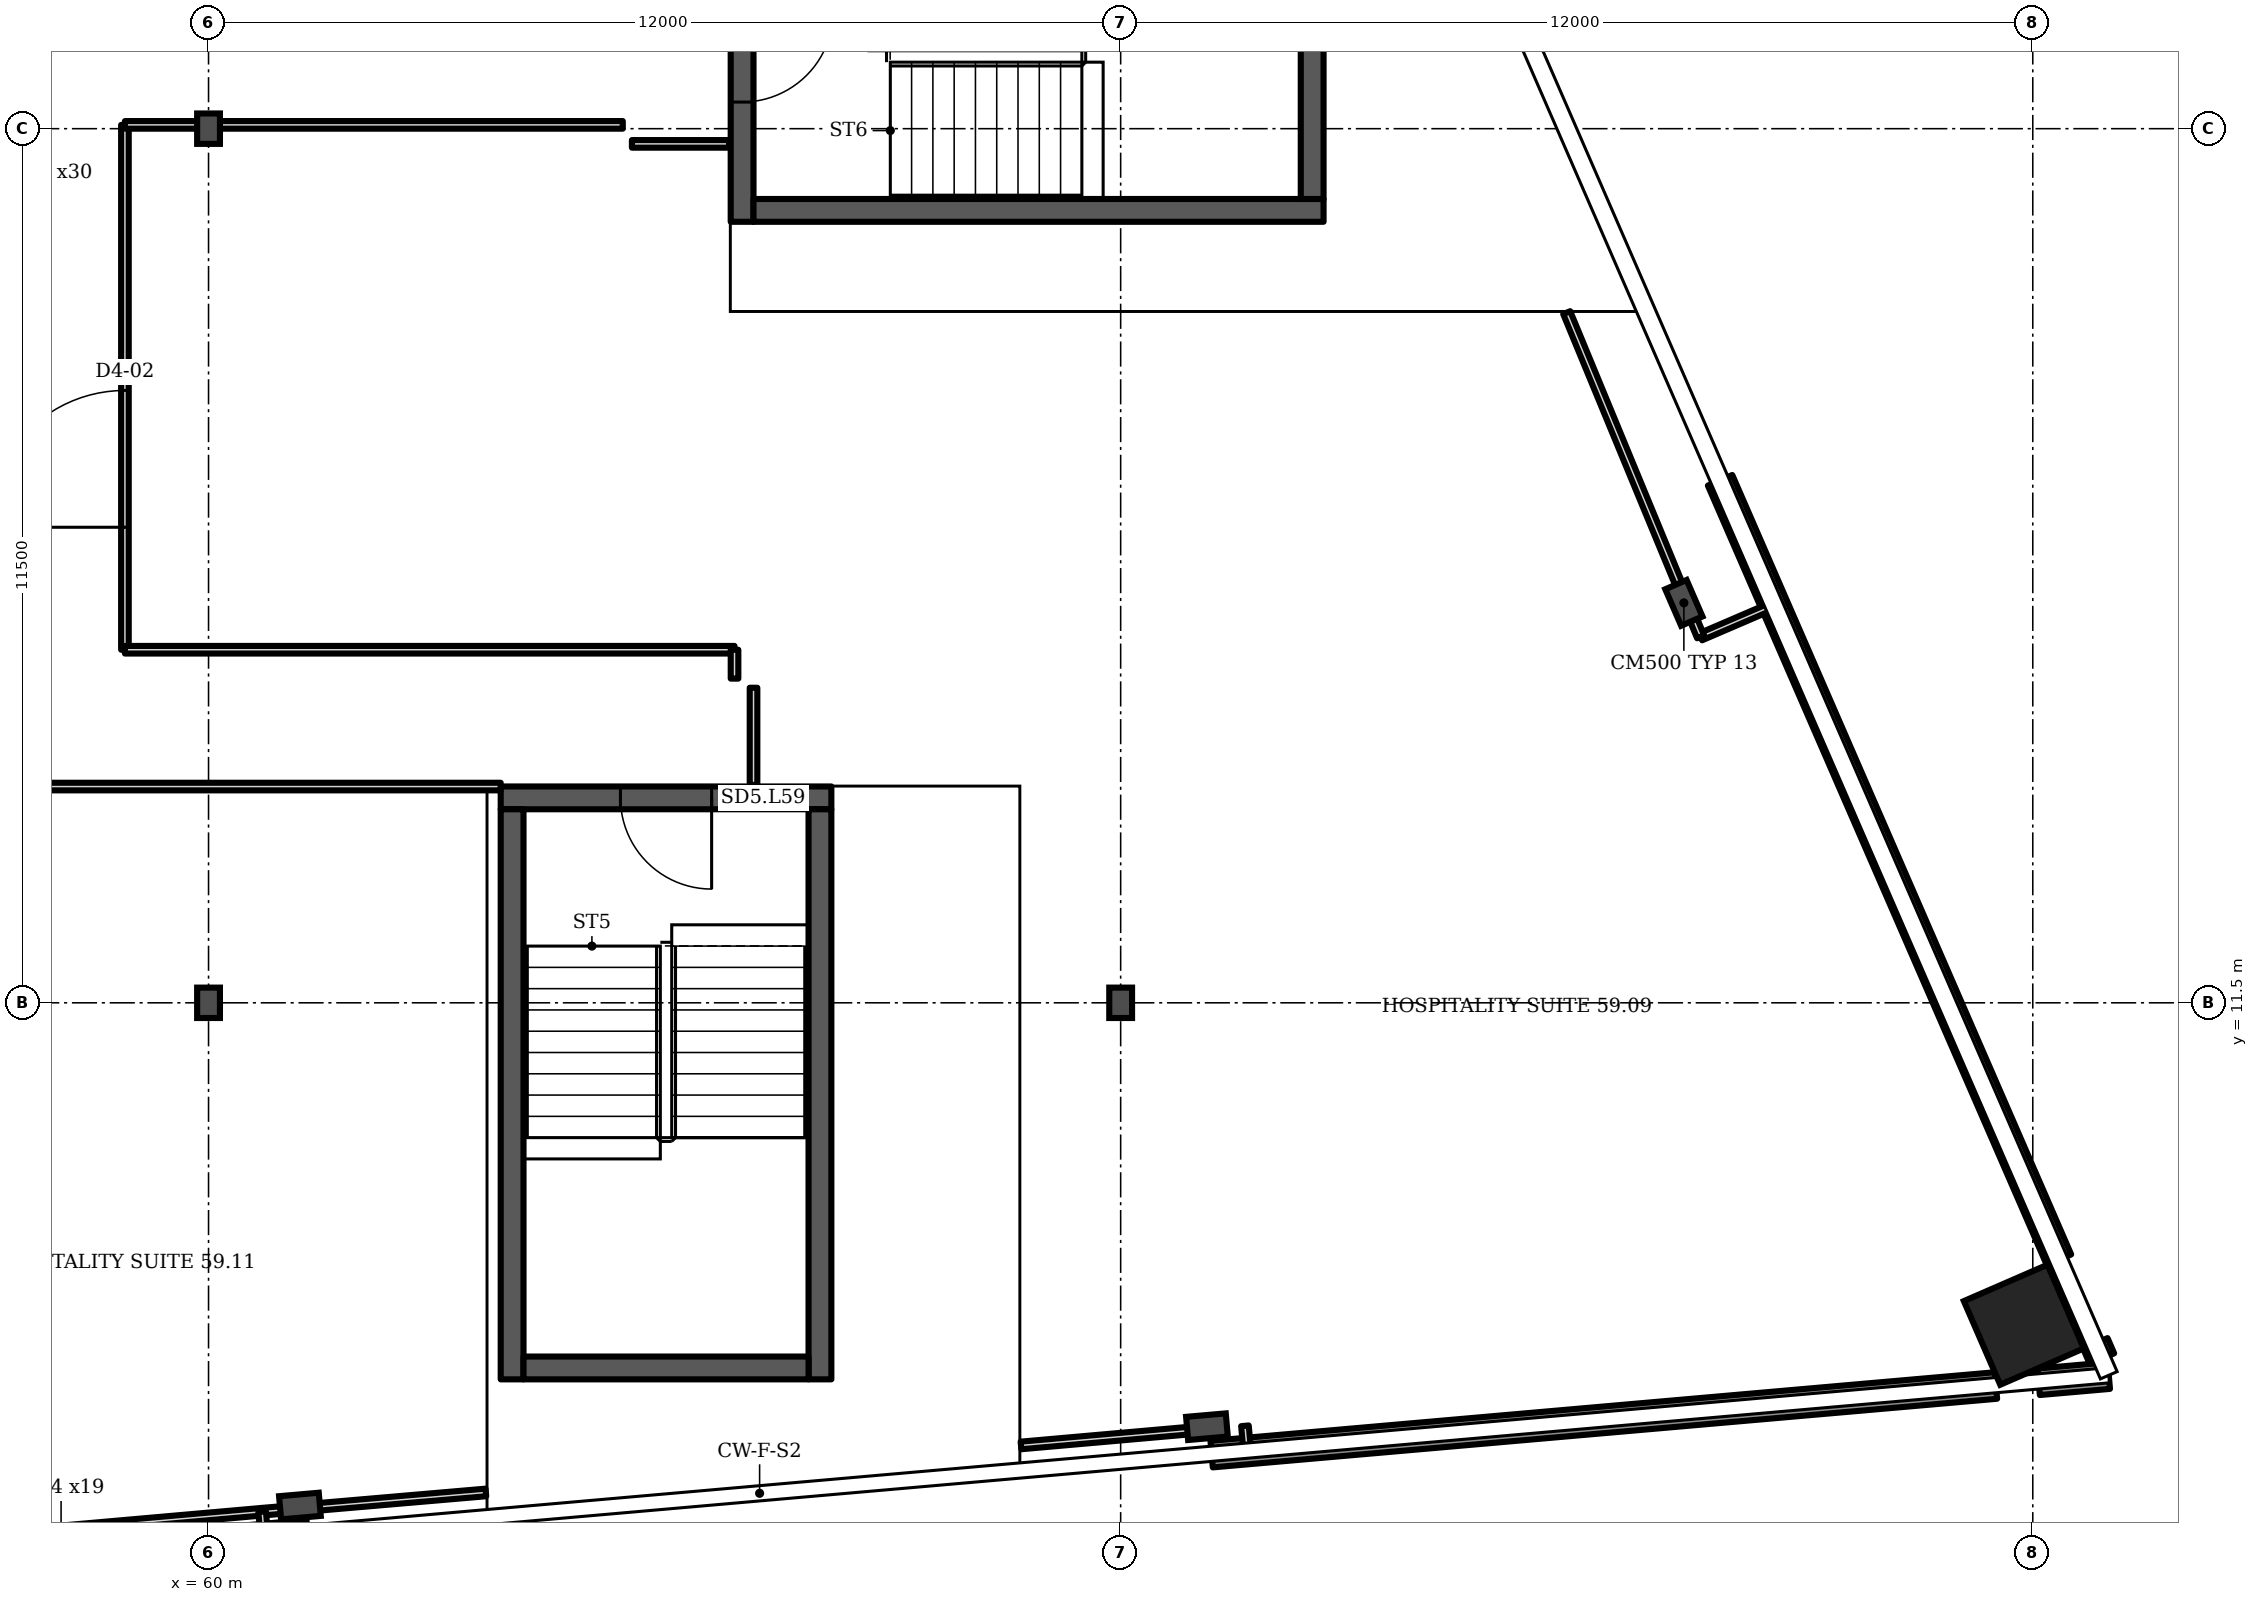
"""IFC4 building model, lengths in metres.
Left out: names, types, materials, properties, quantities, classifications, styles, units other than length and angle.
Written with IfcOpenShell. Run it as: python <this file> out.ifc"""

import sys

from ifc_helpers import new_model, si_unit, direction, frame, frame_2d, origin, origin_2d, place, context, subcontext, project, spatial, rectangle, i_section, extrude, element, fill, save


model = new_model("IFC4")
c1 = context("Model", 3, precision=1e-05, world=origin(), true_north=direction((0.0, 1.0)))
c2 = subcontext(c1, "Body", "Model", "MODEL_VIEW")
j1 = project(units=[si_unit("LENGTHUNIT", "METRE"), si_unit("PLANEANGLEUNIT", "RADIAN")], contexts=[c1])
p1 = place(None, origin())
s1 = spatial("IfcSite", under=j1, at=p1, CompositionType="ELEMENT")
p2 = place(p1, origin())
s2 = spatial("IfcBuilding", under=s1, at=p2, CompositionType="ELEMENT")
p3 = place(p2, frame((0.0, 0.0, 235.9)))
s3 = spatial("IfcBuildingStorey", under=s2, at=p3, CompositionType="ELEMENT", Elevation=235.9)
p4 = place(p3, frame((83.883, 7.265, 0.0), z_axis=(0.0, 0.0, 1.0), x_axis=(-0.398727, 0.917072, 0.0)))
e1 = element("IfcColumn", 1, at=p4, inside=s3, PredefinedType="COLUMN", context=c2, shape_type="SweptSolid", body=[
    extrude(rectangle(XDim=1.2, YDim=1.2, at=origin_2d()), origin(), (0.0, 0.0, 1.0), 3.6),
])
for number, where, z_axis, x_axis in (
    (2, (61.202, 4.879, 0.0), (0.0, 0.0, 1.0), (0.087, -0.996, 0.0)),
    (3, (73.135, 5.923, 0.0), (0.0, 0.0, 1.0), (0.087, -0.996, 0.0)),
    (4, (79.41, 16.762, 0.0), (0.0, 0.0, 1.0), (0.917, 0.399, 0.0)),
):
    element("IfcColumn", number, at=place(p3, frame(where, z_axis=z_axis, x_axis=x_axis)), inside=s3, PredefinedType="COLUMN", context=c2, shape_type="SweptSolid", body=[
        extrude(i_section(OverallWidth=0.306, OverallDepth=0.524, WebThickness=0.021, FlangeThickness=0.04, FilletRadius=0.027, at=origin_2d()), origin(), (0.0, 0.0, 1.0), 3.6),
    ])
for number, where, z_axis, x_axis in (
    (5, (60.0, 11.5, 0.0), (0.0, 0.0, 1.0), (1.0, 0.0, 0.0)),
    (6, (72.0, 11.5, 0.0), (0.0, 0.0, 1.0), (1.0, 0.0, 0.0)),
    (7, (60.0, 23.0, 0.0), (0.0, 0.0, 1.0), (1.0, 0.0, 0.0)),
):
    element("IfcColumn", number, at=place(p3, frame(where, z_axis=z_axis, x_axis=x_axis)), inside=s3, PredefinedType="COLUMN", context=c2, shape_type="SweptSolid", body=[
        extrude(i_section(OverallWidth=0.3, OverallDepth=0.4, WebThickness=0.013, FlangeThickness=0.024, FilletRadius=0.027, at=origin_2d()), origin(), (0.0, 0.0, 1.0), 3.6),
    ])
p5 = place(p3, frame((49.545, 3.493, 0.0), z_axis=(0.0, 0.0, 1.0), x_axis=(0.996196, 0.087141, 0.0)))
e8 = element("IfcWall", 8, at=p5, inside=s3, PredefinedType="SOLIDWALL", context=c2, shape_type="SweptSolid", body=[
    extrude(rectangle(XDim=11.803, YDim=0.35, at=frame_2d((5.902, 0.0))), origin(), (0.0, 0.0, 1.0), 1.0),
])
p6 = place(p3, frame((73.197, 5.562, 0.0), z_axis=(0.0, 0.0, 1.0), x_axis=(0.996198, 0.087163, 0.0)))
e9 = element("IfcWall", 9, at=p6, inside=s3, PredefinedType="SOLIDWALL", context=c2, shape_type="SweptSolid", body=[
    extrude(rectangle(XDim=10.358, YDim=0.35, at=frame_2d((5.179, 0.0))), origin(), (0.0, 0.0, 1.0), 1.0),
])
p7 = place(p3, frame((84.078, 6.514, 0.0), z_axis=(0.0, 0.0, 1.0), x_axis=(0.996213, 0.086971, 0.0)))
e10 = element("IfcWall", 10, at=p7, inside=s3, PredefinedType="SOLIDWALL", context=c2, shape_type="SweptSolid", body=[
    extrude(rectangle(XDim=0.926, YDim=0.35, at=frame_2d((0.463, 0.0))), origin(), (0.0, 0.0, 1.0), 1.0),
])
p8 = place(p3, frame((84.91, 6.819, 0.0), z_axis=(0.0, 0.0, 1.0), x_axis=(-0.398359, 0.91723, 0.0)))
e11 = element("IfcWall", 11, at=p8, inside=s3, PredefinedType="SOLIDWALL", context=c2, shape_type="SweptSolid", body=[
    extrude(rectangle(XDim=0.219, YDim=0.35, at=frame_2d((0.109, 0.0))), origin(), (0.0, 0.0, 1.0), 1.0),
])
p9 = place(p3, frame((84.345, 8.12, 0.0), z_axis=(0.0, 0.0, 1.0), x_axis=(-0.398721, 0.917067, 0.0)))
e12 = element("IfcWall", 12, at=p9, inside=s3, PredefinedType="SOLIDWALL", context=c2, shape_type="SweptSolid", body=[
    extrude(rectangle(XDim=11.182, YDim=0.35, at=frame_2d((5.591, 0.0))), origin(), (0.0, 0.0, 1.0), 1.0),
])
p10 = place(p3, frame((63.844, 14.196, 0.0), z_axis=(0.0, 0.0, 1.0), x_axis=(1.0, 0.0, 0.0)))
e13 = element("IfcWall", 13, at=p10, inside=s3, PredefinedType="SHEAR", context=c2, shape_type="SweptSolid", body=[
    extrude(rectangle(XDim=4.35, YDim=0.3, at=frame_2d((2.175, 0.0))), origin(), (0.0, 0.0, 1.0), 3.2),
])
p11 = place(p10, frame((1.575, 0.0, 0.0)))
e14 = element("IfcOpeningElement", 14, at=p11, cuts=e13, PredefinedType="OPENING", context=c2, shape_type="SweptSolid", body=[
    extrude(rectangle(XDim=1.2, YDim=2.1, at=frame_2d((0.6, 1.05))), frame((0.0, 0.16, 0.0), z_axis=(0.0, -1.0, 0.0), x_axis=(1.0, 0.0, 0.0)), (0.0, 0.0, 1.0), 0.32),
])
p12 = place(p3, frame((67.02, 21.775, 0.0), z_axis=(0.0, 0.0, 1.0), x_axis=(0.0, 1.0, 0.0)))
e15 = element("IfcWall", 15, at=p12, inside=s3, PredefinedType="SHEAR", context=c2, shape_type="SweptSolid", body=[
    extrude(rectangle(XDim=4.35, YDim=0.3, at=frame_2d((2.175, 0.0))), origin(), (0.0, 0.0, 1.0), 3.2),
])
p13 = place(p12, frame((1.575, 0.0, 0.0)))
e16 = element("IfcOpeningElement", 16, at=p13, cuts=e15, PredefinedType="OPENING", context=c2, shape_type="SweptSolid", body=[
    extrude(rectangle(XDim=1.2, YDim=2.1, at=frame_2d((0.6, 1.05))), frame((0.0, 0.16, 0.0), z_axis=(0.0, -1.0, 0.0), x_axis=(1.0, 0.0, 0.0)), (0.0, 0.0, 1.0), 0.32),
])
p14 = place(p3, frame((55.415, 4.34, 0.0), z_axis=(0.0, 0.0, 1.0), x_axis=(0.996159, 0.087534, 0.0)))
e17 = element("IfcWall", 17, at=p14, inside=s3, PredefinedType="PARTITIONING", context=c2, shape_type="SweptSolid", body=[
    extrude(rectangle(XDim=5.31, YDim=0.1, at=frame_2d((2.655, 0.0))), origin(), (0.0, 0.0, 1.0), 2.58),
])
p15 = place(p3, frame((57.1, 14.345, 0.0), z_axis=(0.0, 0.0, 1.0), x_axis=(1.0, 0.0, 0.0)))
e18 = element("IfcWall", 18, at=p15, inside=s3, PredefinedType="PARTITIONING", context=c2, shape_type="SweptSolid", body=[
    extrude(rectangle(XDim=6.744, YDim=0.1, at=frame_2d((3.372, 0.0))), origin(), (0.0, 0.0, 1.0), 3.2),
])
p16 = place(p3, frame((58.9, 16.145, 0.0), z_axis=(0.0, 0.0, 1.0), x_axis=(0.0, 1.0, 0.0)))
e19 = element("IfcWall", 19, at=p16, inside=s3, PredefinedType="PARTITIONING", context=c2, shape_type="SweptSolid", body=[
    extrude(rectangle(XDim=6.905, YDim=0.1, at=frame_2d((3.453, 0.0))), origin(), (0.0, 0.0, 1.0), 3.2),
])
p17 = place(p16, frame((1.611, 0.0, 0.0)))
e20 = element("IfcOpeningElement", 20, at=p17, cuts=e19, PredefinedType="OPENING", context=c2, shape_type="SweptSolid", body=[
    extrude(rectangle(XDim=1.8, YDim=2.1, at=frame_2d((0.9, 1.05))), frame((0.0, 0.06, 0.0), z_axis=(0.0, -1.0, 0.0), x_axis=(1.0, 0.0, 0.0)), (0.0, 0.0, 1.0), 0.12),
])
p18 = place(p3, frame((58.9, 16.145, 0.0), z_axis=(0.0, 0.0, 1.0), x_axis=(1.0, 0.0, 0.0)))
e21 = element("IfcWall", 21, at=p18, inside=s3, PredefinedType="PARTITIONING", context=c2, shape_type="SweptSolid", body=[
    extrude(rectangle(XDim=8.02, YDim=0.1, at=frame_2d((4.01, 0.0))), origin(), (0.0, 0.0, 1.0), 3.2),
])
p19 = place(p3, frame((58.9, 23.05, 0.0), z_axis=(0.0, 0.0, 1.0), x_axis=(1.0, 0.0, 0.0)))
e22 = element("IfcWall", 22, at=p19, inside=s3, PredefinedType="PARTITIONING", context=c2, shape_type="SweptSolid", body=[
    extrude(rectangle(XDim=6.55, YDim=0.1, at=frame_2d((3.275, 0.0))), origin(), (0.0, 0.0, 1.0), 3.2),
])
p20 = place(p3, frame((60.705, 4.805, 0.0), z_axis=(0.0, 0.0, 1.0), x_axis=(0.996324, 0.085692, 0.0)))
e23 = element("IfcWall", 23, at=p20, inside=s3, PredefinedType="PARTITIONING", context=c2, shape_type="SweptSolid", body=[
    extrude(rectangle(XDim=2.955, YDim=0.1, at=frame_2d((1.477, 0.0))), origin(), (0.0, 0.0, 1.0), 2.58),
])
p21 = place(p3, frame((60.733, 4.497, 0.0), z_axis=(0.0, 0.0, 1.0), x_axis=(-0.090037, 0.995936, 0.0)))
e24 = element("IfcWall", 24, at=p21, inside=s3, PredefinedType="PARTITIONING", context=c2, shape_type="SweptSolid", body=[
    extrude(rectangle(XDim=0.309, YDim=0.1, at=frame_2d((0.155, 0.0))), origin(), (0.0, 0.0, 1.0), 3.2),
])
p22 = place(p3, frame((65.57, 22.8, 0.0), z_axis=(0.0, 0.0, 1.0), x_axis=(1.0, 0.0, 0.0)))
e25 = element("IfcWall", 25, at=p22, inside=s3, PredefinedType="PARTITIONING", context=c2, shape_type="SweptSolid", body=[
    extrude(rectangle(XDim=1.28, YDim=0.1, at=frame_2d((0.64, 0.0))), origin(), (0.0, 0.0, 1.0), 3.2),
])
p23 = place(p3, frame((66.92, 15.765, 0.0), z_axis=(0.0, 0.0, 1.0), x_axis=(0.0, 1.0, 0.0)))
e26 = element("IfcWall", 26, at=p23, inside=s3, PredefinedType="PARTITIONING", context=c2, shape_type="SweptSolid", body=[
    extrude(rectangle(XDim=0.38, YDim=0.1, at=frame_2d((0.19, 0.0))), origin(), (0.0, 0.0, 1.0), 3.2),
])
p24 = place(p3, frame((67.17, 14.366, 0.0), z_axis=(0.0, 0.0, 1.0), x_axis=(0.0, 1.0, 0.0)))
e27 = element("IfcWall", 27, at=p24, inside=s3, PredefinedType="PARTITIONING", context=c2, shape_type="SweptSolid", body=[
    extrude(rectangle(XDim=1.279, YDim=0.1, at=frame_2d((0.639, 0.0))), origin(), (0.0, 0.0, 1.0), 3.2),
])
p25 = place(p3, frame((70.689, 5.677, 0.0), z_axis=(0.0, 0.0, 1.0), x_axis=(0.996136, 0.087799, 0.0)))
e28 = element("IfcWall", 28, at=p25, inside=s3, PredefinedType="PARTITIONING", context=c2, shape_type="SweptSolid", body=[
    extrude(rectangle(XDim=2.486, YDim=0.1, at=frame_2d((1.243, 0.0))), origin(), (0.0, 0.0, 1.0), 2.58),
])
p26 = place(p3, frame((73.663, 5.628, 0.0), z_axis=(0.0, 0.0, 1.0), x_axis=(-0.091893, 0.995772, 0.0)))
e29 = element("IfcWall", 29, at=p26, inside=s3, PredefinedType="PARTITIONING", context=c2, shape_type="SweptSolid", body=[
    extrude(rectangle(XDim=0.308, YDim=0.1, at=frame_2d((0.154, 0.0))), origin(), (0.0, 0.0, 1.0), 3.2),
])
p27 = place(p3, frame((79.63, 16.315, 0.0), z_axis=(0.0, 0.0, 1.0), x_axis=(0.918616, 0.395147, 0.0)))
e30 = element("IfcWall", 30, at=p27, inside=s3, PredefinedType="PARTITIONING", context=c2, shape_type="SweptSolid", body=[
    extrude(rectangle(XDim=1.031, YDim=0.1, at=frame_2d((0.516, 0.0))), origin(), (0.0, 0.0, 1.0), 2.58),
])
p28 = place(p3, frame((79.63, 16.315, 0.0), z_axis=(0.0, 0.0, 1.0), x_axis=(-0.381721, 0.924278, 0.0)))
e31 = element("IfcWall", 31, at=p28, inside=s3, PredefinedType="PARTITIONING", context=c2, shape_type="SweptSolid", body=[
    extrude(rectangle(XDim=4.615, YDim=0.1, at=frame_2d((2.307, 0.0))), origin(), (0.0, 0.0, 1.0), 3.2),
])
for number, where, z_axis, x_axis in (
    (32, (63.994, 6.546, 0.0), (0.0, 0.0, 1.0), (0.0, 1.0, 0.0)),
    (33, (68.044, 6.546, 0.0), (0.0, 0.0, 1.0), (0.0, 1.0, 0.0)),
):
    element("IfcWall", number, at=place(p3, frame(where, z_axis=z_axis, x_axis=x_axis)), inside=s3, PredefinedType="SHEAR", context=c2, shape_type="SweptSolid", body=[
        extrude(rectangle(XDim=7.5, YDim=0.3, at=frame_2d((3.75, 0.0))), origin(), (0.0, 0.0, 1.0), 3.2),
    ])
p29 = place(p3, frame((64.144, 6.696, 0.0), z_axis=(0.0, 0.0, 1.0), x_axis=(1.0, 0.0, 0.0)))
e34 = element("IfcWall", 34, at=p29, inside=s3, PredefinedType="SHEAR", context=c2, shape_type="SweptSolid", body=[
    extrude(rectangle(XDim=3.75, YDim=0.3, at=frame_2d((1.875, 0.0))), origin(), (0.0, 0.0, 1.0), 3.2),
])
p30 = place(p3, frame((67.17, 21.925, 0.0), z_axis=(0.0, 0.0, 1.0), x_axis=(1.0, 0.0, 0.0)))
e35 = element("IfcWall", 35, at=p30, inside=s3, PredefinedType="SHEAR", context=c2, shape_type="SweptSolid", body=[
    extrude(rectangle(XDim=7.5, YDim=0.3, at=frame_2d((3.75, 0.0))), origin(), (0.0, 0.0, 1.0), 3.2),
])
p31 = place(p3, frame((74.52, 22.075, 0.0), z_axis=(0.0, 0.0, 1.0), x_axis=(0.0, 1.0, 0.0)))
e36 = element("IfcWall", 36, at=p31, inside=s3, PredefinedType="SHEAR", context=c2, shape_type="SweptSolid", body=[
    extrude(rectangle(XDim=3.75, YDim=0.3, at=frame_2d((1.875, 0.0))), origin(), (0.0, 0.0, 1.0), 3.2),
])
p32 = place(p11, origin())
e37 = element("IfcDoor", 37, at=p32, inside=s3, OperationType="SINGLE_SWING_RIGHT", PredefinedType="DOOR", context=c2, shape_type="SweptSolid", body=[
    extrude(rectangle(XDim=1.2, YDim=2.1, at=frame_2d((0.6, 1.05))), frame((0.0, 0.025, 0.0), z_axis=(0.0, -1.0, 0.0), x_axis=(1.0, 0.0, 0.0)), (0.0, 0.0, 1.0), 0.05),
])
fill(e14, e37)
p33 = place(p13, origin())
e38 = element("IfcDoor", 38, at=p33, inside=s3, OperationType="SINGLE_SWING_RIGHT", PredefinedType="DOOR", context=c2, shape_type="SweptSolid", body=[
    extrude(rectangle(XDim=1.2, YDim=2.1, at=frame_2d((0.6, 1.05))), frame((0.0, 0.025, 0.0), z_axis=(0.0, -1.0, 0.0), x_axis=(1.0, 0.0, 0.0)), (0.0, 0.0, 1.0), 0.05),
])
fill(e16, e38)
p34 = place(p17, origin())
e39 = element("IfcDoor", 39, at=p34, inside=s3, OperationType="DOUBLE_DOOR_SINGLE_SWING", PredefinedType="DOOR", context=c2, shape_type="SweptSolid", body=[
    extrude(rectangle(XDim=1.8, YDim=2.1, at=frame_2d((0.9, 1.05))), frame((0.0, 0.025, 0.0), z_axis=(0.0, -1.0, 0.0), x_axis=(1.0, 0.0, 0.0)), (0.0, 0.0, 1.0), 0.05),
])
fill(e20, e39)
save(model, sys.argv[1])
